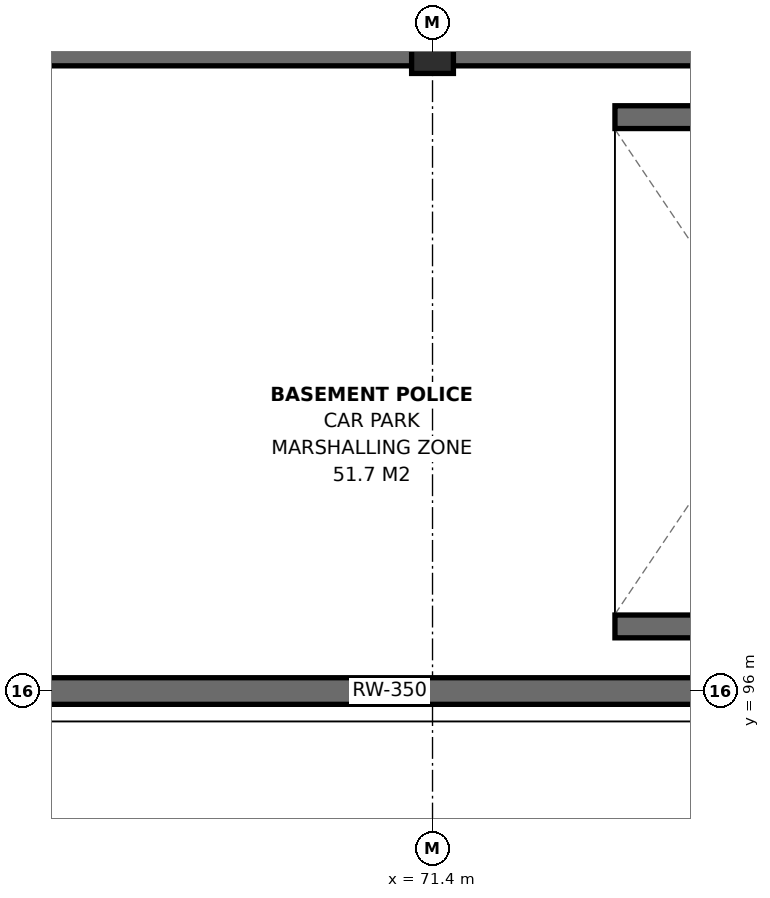
"""IFC4 building model, lengths in metres.
Left out: names, types, materials, properties, quantities, classifications, styles, units other than length and angle.
Written with IfcOpenShell. Run it as: python <this file> out.ifc"""

import sys

from ifc_helpers import new_model, si_unit, direction, frame, frame_2d, origin, origin_2d, place, context, subcontext, project, spatial, rectangle, extrude, element, save


model = new_model("IFC4")
c1 = context("Model", 3, precision=1e-05, world=origin(), true_north=direction((0.0, 1.0)))
c2 = subcontext(c1, "Body", "Model", "MODEL_VIEW")
j1 = project(units=[si_unit("LENGTHUNIT", "METRE"), si_unit("PLANEANGLEUNIT", "RADIAN")], contexts=[c1])
p1 = place(None, origin())
s1 = spatial("IfcSite", under=j1, at=p1, CompositionType="ELEMENT")
p2 = place(p1, origin())
s2 = spatial("IfcBuilding", under=s1, at=p2, CompositionType="ELEMENT")
p3 = place(p2, frame((0.0, 0.0, -4.2)))
s3 = spatial("IfcBuildingStorey", under=s2, at=p3, CompositionType="ELEMENT", Elevation=-4.2)
p4 = place(p3, frame((71.4, 104.4, 0.0), z_axis=(0.0, 0.0, 1.0), x_axis=(1.0, 0.0, 0.0)))
e1 = element("IfcColumn", 1, at=p4, inside=s3, PredefinedType="COLUMN", context=c2, shape_type="SweptSolid", body=[
    extrude(rectangle(XDim=0.55, YDim=0.55, at=origin_2d()), origin(), (0.0, 0.0, 1.0), 4.2),
])
p5 = place(p3, frame((63.425, 96.0, 0.0), z_axis=(0.0, 0.0, 1.0), x_axis=(1.0, 0.0, 0.0)))
e2 = element("IfcWall", 2, at=p5, inside=s3, PredefinedType="USERDEFINED", context=c2, shape_type="SweptSolid", body=[
    extrude(rectangle(XDim=50.35, YDim=0.35, at=frame_2d((25.175, 0.0))), origin(), (0.0, 0.0, 1.0), 3.92),
])
p6 = place(p3, frame((78.175, 104.4, 0.0), z_axis=(0.0, 0.0, 1.0), x_axis=(-1.0, 0.0, 0.0)))
e3 = element("IfcWall", 3, at=p6, inside=s3, PredefinedType="USERDEFINED", context=c2, shape_type="SweptSolid", body=[
    extrude(rectangle(XDim=56.15, YDim=0.35, at=frame_2d((28.075, 0.0))), origin(), (0.0, 0.0, 1.0), 3.92),
])
for number, where, z_axis, x_axis in (
    (4, (73.8, 96.85, 0.0), (0.0, 0.0, 1.0), (1.0, 0.0, 0.0)),
    (5, (73.8, 103.55, 0.0), (0.0, 0.0, 1.0), (1.0, 0.0, 0.0)),
):
    element("IfcWall", number, at=place(p3, frame(where, z_axis=z_axis, x_axis=x_axis)), inside=s3, PredefinedType="USERDEFINED", context=c2, shape_type="SweptSolid", body=[
        extrude(rectangle(XDim=33.75, YDim=0.3, at=frame_2d((16.875, 0.0))), origin(), (0.0, 0.0, 1.0), 5.35),
    ])
save(model, sys.argv[1])
